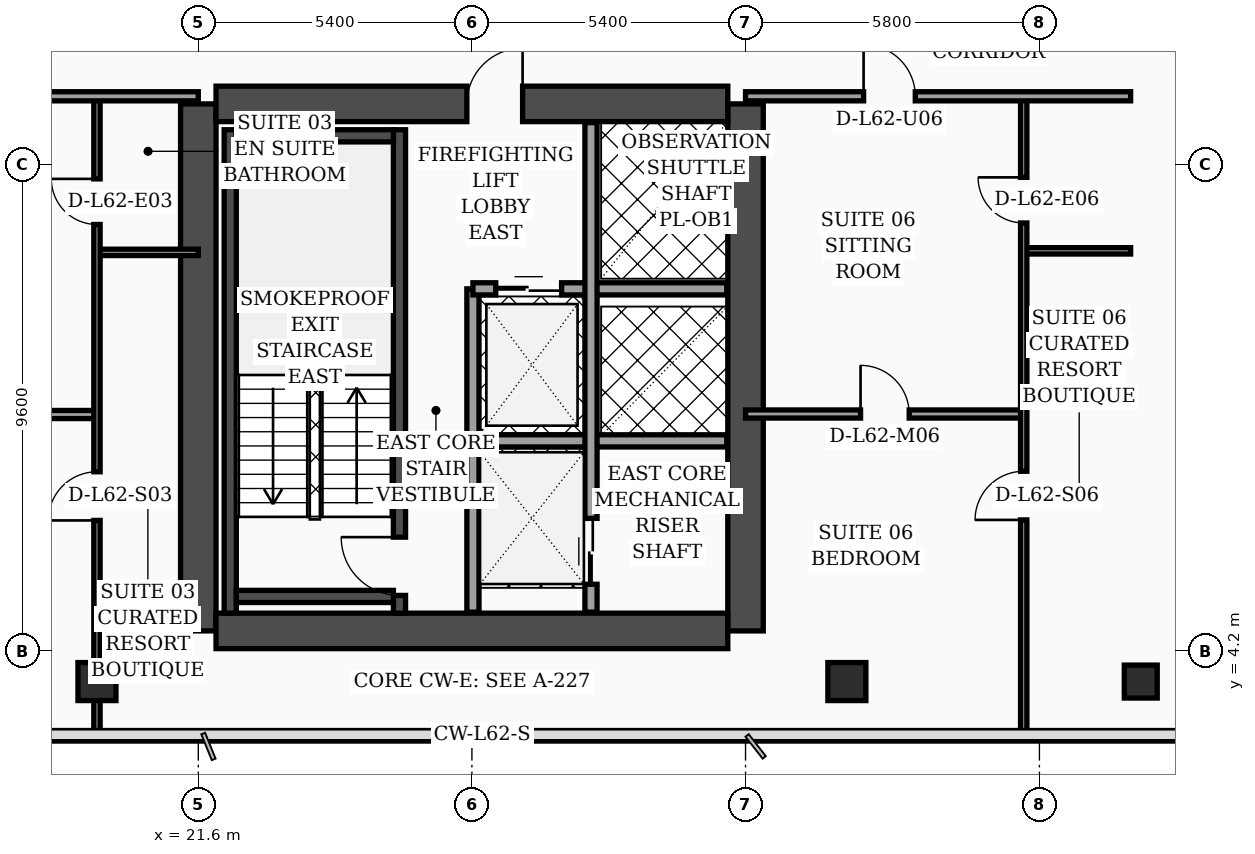
"""IFC4 building model, lengths in metres.
Left out: names, types, materials, properties, quantities, classifications, styles, units other than length and angle.
Written with IfcOpenShell. Run it as: python <this file> out.ifc"""

import sys

from ifc_helpers import new_model, si_unit, direction, frame, frame_2d, origin, origin_2d, place, context, subcontext, project, spatial, rectangle, hollow_rectangle, extrude, element, fill, save


model = new_model("IFC4")
c1 = context("Model", 3, precision=1e-05, world=origin(), true_north=direction((0.0, 1.0)))
c2 = subcontext(c1, "Body", "Model", "MODEL_VIEW")
j1 = project(units=[si_unit("LENGTHUNIT", "METRE"), si_unit("PLANEANGLEUNIT", "RADIAN")], contexts=[c1])
p1 = place(None, origin())
s1 = spatial("IfcSite", under=j1, at=p1, CompositionType="ELEMENT")
p2 = place(p1, origin())
s2 = spatial("IfcBuilding", under=s1, at=p2, CompositionType="ELEMENT")
p3 = place(p2, frame((0.0, 0.0, 251.4)))
s3 = spatial("IfcBuildingStorey", under=s2, at=p3, CompositionType="ELEMENT", Elevation=251.4)
for number, where, z_axis, x_axis in (
    (1, (21.6, 4.6, 0.0), (0.0, 0.0, 1.0), (0.0, 1.0, 0.0)),
    (2, (32.4, 4.6, 0.0), (0.0, 0.0, 1.0), (0.0, 1.0, 0.0)),
):
    element("IfcWall", number, at=place(p3, frame(where, z_axis=z_axis, x_axis=x_axis)), inside=s3, PredefinedType="SHEAR", context=c2, shape_type="SweptSolid", body=[
        extrude(rectangle(XDim=10.4, YDim=0.7, at=frame_2d((5.2, 0.0))), origin(), (0.0, 0.0, 1.0), 3.56),
    ])
p4 = place(p3, frame((21.95, 15.0, 0.0), z_axis=(0.0, 0.0, 1.0), x_axis=(1.0, 0.0, 0.0)))
e3 = element("IfcWall", 3, at=p4, inside=s3, PredefinedType="SHEAR", context=c2, shape_type="SweptSolid", body=[
    extrude(rectangle(XDim=10.1, YDim=0.7, at=frame_2d((5.05, 0.0))), origin(), (0.0, 0.0, 1.0), 3.56),
])
p5 = place(p4, frame((4.95, 0.0, 0.0)))
e4 = element("IfcOpeningElement", 4, at=p5, cuts=e3, PredefinedType="OPENING", context=c2, shape_type="SweptSolid", body=[
    extrude(rectangle(XDim=1.1, YDim=2.2, at=frame_2d((0.55, 1.1))), frame((0.0, 0.36, 0.0), z_axis=(0.0, -1.0, 0.0), x_axis=(1.0, 0.0, 0.0)), (0.0, 0.0, 1.0), 0.72),
])
p6 = place(p3, frame((21.95, 4.6, 0.0), z_axis=(0.0, 0.0, 1.0), x_axis=(1.0, 0.0, 0.0)))
e5 = element("IfcWall", 5, at=p6, inside=s3, PredefinedType="SHEAR", context=c2, shape_type="SweptSolid", body=[
    extrude(rectangle(XDim=10.1, YDim=0.7, at=frame_2d((5.05, 0.0))), origin(), (0.0, 0.0, 1.0), 3.56),
])
p7 = place(p3, frame((22.23, 4.95, 0.0), z_axis=(0.0, 0.0, 1.0), x_axis=(0.0, 1.0, 0.0)))
e6 = element("IfcWall", 6, at=p7, inside=s3, PredefinedType="SOLIDWALL", context=c2, shape_type="SweptSolid", body=[
    extrude(rectangle(XDim=9.54, YDim=0.24, at=frame_2d((4.77, 0.0))), origin(), (0.0, 0.0, 1.0), 3.56),
])
p8 = place(p3, frame((25.57, 4.95, 0.0), z_axis=(0.0, 0.0, 1.0), x_axis=(0.0, 1.0, 0.0)))
e7 = element("IfcWall", 7, at=p8, inside=s3, PredefinedType="SOLIDWALL", context=c2, shape_type="SweptSolid", body=[
    extrude(rectangle(XDim=9.54, YDim=0.24, at=frame_2d((4.77, 0.0))), origin(), (0.0, 0.0, 1.0), 3.56),
])
p9 = place(p8, frame((0.35, 0.0, 0.0)))
e8 = element("IfcOpeningElement", 8, at=p9, cuts=e7, PredefinedType="OPENING", context=c2, shape_type="SweptSolid", body=[
    extrude(rectangle(XDim=1.15, YDim=2.2, at=frame_2d((0.575, 1.1))), frame((0.0, 0.13, 0.0), z_axis=(0.0, -1.0, 0.0), x_axis=(1.0, 0.0, 0.0)), (0.0, 0.0, 1.0), 0.26),
])
for number, where, z_axis, x_axis in (
    (9, (22.35, 5.28, 0.0), (0.0, 0.0, 1.0), (1.0, 0.0, 0.0)),
    (10, (22.35, 14.37, 0.0), (0.0, 0.0, 1.0), (1.0, 0.0, 0.0)),
):
    element("IfcWall", number, at=place(p3, frame(where, z_axis=z_axis, x_axis=x_axis)), inside=s3, PredefinedType="SOLIDWALL", context=c2, shape_type="SweptSolid", body=[
        extrude(rectangle(XDim=3.1, YDim=0.24, at=frame_2d((1.55, 0.0))), origin(), (0.0, 0.0, 1.0), 3.56),
    ])
for number, where, z_axis, x_axis in (
    (11, (19.6, 3.6, 0.0), (0.0, 0.0, 1.0), (1.0, 0.0, 0.0)),
    (12, (34.4, 3.6, 0.0), (0.0, 0.0, 1.0), (1.0, 0.0, 0.0)),
):
    element("IfcColumn", number, at=place(p3, frame(where, z_axis=z_axis, x_axis=x_axis)), inside=s3, PredefinedType="COLUMN", context=c2, shape_type="SweptSolid", body=[
        extrude(hollow_rectangle(XDim=0.75, YDim=0.75, WallThickness=0.032, at=origin_2d()), origin(), (0.0, 0.0, 1.0), 3.56),
    ])
p10 = place(p3, frame((40.2, 3.6, 0.0), z_axis=(0.0, 0.0, 1.0), x_axis=(1.0, 0.0, 0.0)))
e13 = element("IfcColumn", 13, at=p10, inside=s3, PredefinedType="COLUMN", context=c2, shape_type="SweptSolid", body=[
    extrude(hollow_rectangle(XDim=0.65, YDim=0.65, WallThickness=0.028, at=origin_2d()), origin(), (0.0, 0.0, 1.0), 3.56),
])
p11 = place(p3, frame((46.63, 5.505, 0.0), z_axis=(0.0, 0.0, 1.0), x_axis=(-0.300501856448, 0.953781229775, 0.0)))
e14 = element("IfcWall", 14, at=p11, inside=s3, PredefinedType="SOLIDWALL", context=c2, shape_type="SweptSolid", body=[
    extrude(rectangle(XDim=30.814, YDim=0.32, at=frame_2d((15.407, 0.0))), origin(), (0.0, 0.0, 1.0), 3.56),
])
p12 = place(p11, frame((10.199, 0.0, 0.0)))
e15 = element("IfcOpeningElement", 15, at=p12, cuts=e14, PredefinedType="OPENING", context=c2, shape_type="SweptSolid", body=[
    extrude(rectangle(XDim=1.4, YDim=2.25, at=frame_2d((0.7, 1.125))), frame((0.0, 0.17, 0.0), z_axis=(0.0, -1.0, 0.0), x_axis=(1.0, 0.0, 0.0)), (0.0, 0.0, 1.0), 0.34),
])
p13 = place(p11, frame((4.437, 0.0, 0.7)))
e16 = element("IfcOpeningElement", 16, at=p13, cuts=e14, PredefinedType="OPENING", context=c2, shape_type="SweptSolid", body=[
    extrude(rectangle(XDim=1.6, YDim=1.65, at=frame_2d((0.8, 0.825))), frame((0.0, 0.17, 0.0), z_axis=(0.0, -1.0, 0.0), x_axis=(1.0, 0.0, 0.0)), (0.0, 0.0, 1.0), 0.34),
])
p14 = place(p11, frame((18.696, 0.0, 0.7)))
e17 = element("IfcOpeningElement", 17, at=p14, cuts=e14, PredefinedType="OPENING", context=c2, shape_type="SweptSolid", body=[
    extrude(rectangle(XDim=1.6, YDim=1.65, at=frame_2d((0.8, 0.825))), frame((0.0, 0.17, 0.0), z_axis=(0.0, -1.0, 0.0), x_axis=(1.0, 0.0, 0.0)), (0.0, 0.0, 1.0), 0.34),
])
p15 = place(p11, frame((1.6, 0.0, 0.75)))
e18 = element("IfcOpeningElement", 18, at=p15, cuts=e14, PredefinedType="OPENING", context=c2, shape_type="SweptSolid", body=[
    extrude(rectangle(XDim=1.5, YDim=1.6, at=frame_2d((0.75, 0.8))), frame((0.0, 0.17, 0.0), z_axis=(0.0, -1.0, 0.0), x_axis=(1.0, 0.0, 0.0)), (0.0, 0.0, 1.0), 0.34),
])
p16 = place(p11, frame((7.8, 0.0, 0.75)))
e19 = element("IfcOpeningElement", 19, at=p16, cuts=e14, PredefinedType="OPENING", context=c2, shape_type="SweptSolid", body=[
    extrude(rectangle(XDim=1.5, YDim=1.6, at=frame_2d((0.75, 0.8))), frame((0.0, 0.17, 0.0), z_axis=(0.0, -1.0, 0.0), x_axis=(1.0, 0.0, 0.0)), (0.0, 0.0, 1.0), 0.34),
])
p17 = place(p11, frame((14.0, 0.0, 0.75)))
e20 = element("IfcOpeningElement", 20, at=p17, cuts=e14, PredefinedType="OPENING", context=c2, shape_type="SweptSolid", body=[
    extrude(rectangle(XDim=1.5, YDim=1.6, at=frame_2d((0.75, 0.8))), frame((0.0, 0.17, 0.0), z_axis=(0.0, -1.0, 0.0), x_axis=(1.0, 0.0, 0.0)), (0.0, 0.0, 1.0), 0.34),
])
p18 = place(p11, frame((16.55, 0.0, 0.75)))
e21 = element("IfcOpeningElement", 21, at=p18, cuts=e14, PredefinedType="OPENING", context=c2, shape_type="SweptSolid", body=[
    extrude(rectangle(XDim=1.5, YDim=1.6, at=frame_2d((0.75, 0.8))), frame((0.0, 0.17, 0.0), z_axis=(0.0, -1.0, 0.0), x_axis=(1.0, 0.0, 0.0)), (0.0, 0.0, 1.0), 0.34),
])
p19 = place(p11, frame((20.75, 0.0, 0.75)))
e22 = element("IfcOpeningElement", 22, at=p19, cuts=e14, PredefinedType="OPENING", context=c2, shape_type="SweptSolid", body=[
    extrude(rectangle(XDim=1.5, YDim=1.6, at=frame_2d((0.75, 0.8))), frame((0.0, 0.17, 0.0), z_axis=(0.0, -1.0, 0.0), x_axis=(1.0, 0.0, 0.0)), (0.0, 0.0, 1.0), 0.34),
])
p20 = place(p11, frame((23.3, 0.0, 0.75)))
e23 = element("IfcOpeningElement", 23, at=p20, cuts=e14, PredefinedType="OPENING", context=c2, shape_type="SweptSolid", body=[
    extrude(rectangle(XDim=1.5, YDim=1.6, at=frame_2d((0.75, 0.8))), frame((0.0, 0.17, 0.0), z_axis=(0.0, -1.0, 0.0), x_axis=(1.0, 0.0, 0.0)), (0.0, 0.0, 1.0), 0.34),
])
p21 = place(p11, frame((26.4, 0.0, 0.75)))
e24 = element("IfcOpeningElement", 24, at=p21, cuts=e14, PredefinedType="OPENING", context=c2, shape_type="SweptSolid", body=[
    extrude(rectangle(XDim=1.5, YDim=1.6, at=frame_2d((0.75, 0.8))), frame((0.0, 0.17, 0.0), z_axis=(0.0, -1.0, 0.0), x_axis=(1.0, 0.0, 0.0)), (0.0, 0.0, 1.0), 0.34),
])
p22 = place(p3, frame((27.02, 4.97, 0.0), z_axis=(0.0, 0.0, 1.0), x_axis=(0.0, 1.0, 0.0)))
e25 = element("IfcWall", 25, at=p22, inside=s3, PredefinedType="SOLIDWALL", context=c2, shape_type="SweptSolid", body=[
    extrude(rectangle(XDim=6.38, YDim=0.24, at=frame_2d((3.19, 0.0))), origin(), (0.0, 0.0, 1.0), 3.56),
])
p23 = place(p3, frame((27.02, 11.35, 0.0), z_axis=(0.0, 0.0, 1.0), x_axis=(1.0, 0.0, 0.0)))
e26 = element("IfcWall", 26, at=p23, inside=s3, PredefinedType="SOLIDWALL", context=c2, shape_type="SweptSolid", body=[
    extrude(rectangle(XDim=5.01, YDim=0.24, at=frame_2d((2.505, 0.0))), origin(), (0.0, 0.0, 1.0), 3.56),
])
p24 = place(p23, frame((0.45, 0.0, 0.0)))
e27 = element("IfcOpeningElement", 27, at=p24, cuts=e26, PredefinedType="OPENING", context=c2, shape_type="SweptSolid", body=[
    extrude(rectangle(XDim=1.3, YDim=2.35, at=frame_2d((0.65, 1.175))), frame((0.0, 0.13, 0.0), z_axis=(0.0, -1.0, 0.0), x_axis=(1.0, 0.0, 0.0)), (0.0, 0.0, 1.0), 0.26),
])
p25 = place(p3, frame((27.02, 8.35, 0.0), z_axis=(0.0, 0.0, 1.0), x_axis=(1.0, 0.0, 0.0)))
e28 = element("IfcWall", 28, at=p25, inside=s3, PredefinedType="SOLIDWALL", context=c2, shape_type="SweptSolid", body=[
    extrude(rectangle(XDim=5.01, YDim=0.24, at=frame_2d((2.505, 0.0))), origin(), (0.0, 0.0, 1.0), 3.56),
])
p26 = place(p3, frame((29.35, 4.97, 0.0), z_axis=(0.0, 0.0, 1.0), x_axis=(0.0, 1.0, 0.0)))
e29 = element("IfcWall", 29, at=p26, inside=s3, PredefinedType="SOLIDWALL", context=c2, shape_type="SweptSolid", body=[
    extrude(rectangle(XDim=9.66, YDim=0.24, at=frame_2d((4.83, 0.0))), origin(), (0.0, 0.0, 1.0), 3.56),
])
p27 = place(p26, frame((0.55, 0.0, 0.0)))
e30 = element("IfcOpeningElement", 30, at=p27, cuts=e29, PredefinedType="OPENING", context=c2, shape_type="SweptSolid", body=[
    extrude(rectangle(XDim=1.3, YDim=2.35, at=frame_2d((0.65, 1.175))), frame((0.0, 0.13, 0.0), z_axis=(0.0, -1.0, 0.0), x_axis=(1.0, 0.0, 0.0)), (0.0, 0.0, 1.0), 0.26),
])
p28 = place(p3, frame((19.6, 12.07, 0.0), z_axis=(0.0, 0.0, 1.0), x_axis=(1.0, 0.0, 0.0)))
e31 = element("IfcWall", 31, at=p28, inside=s3, PredefinedType="PARTITIONING", context=c2, shape_type="SweptSolid", body=[
    extrude(rectangle(XDim=2.0, YDim=0.125, at=frame_2d((1.0, 0.0))), origin(), (0.0, 0.0, 1.0), 3.56),
])
p29 = place(p3, frame((15.15, 8.87, 0.0), z_axis=(0.0, 0.0, 1.0), x_axis=(1.0, 0.0, 0.0)))
e32 = element("IfcWall", 32, at=p29, inside=s3, PredefinedType="PARTITIONING", context=c2, shape_type="SweptSolid", body=[
    extrude(rectangle(XDim=4.45, YDim=0.16, at=frame_2d((2.225, 0.0))), origin(), (0.0, 0.0, 1.0), 3.56),
])
p30 = place(p29, frame((1.75, 0.0, 0.0)))
e33 = element("IfcOpeningElement", 33, at=p30, cuts=e32, PredefinedType="OPENING", context=c2, shape_type="SweptSolid", body=[
    extrude(rectangle(XDim=0.96, YDim=2.2, at=frame_2d((0.48, 1.1))), frame((0.0, 0.09, 0.0), z_axis=(0.0, -1.0, 0.0), x_axis=(1.0, 0.0, 0.0)), (0.0, 0.0, 1.0), 0.18),
])
p31 = place(p3, frame((19.6, 2.44, 0.0), z_axis=(0.0, 0.0, 1.0), x_axis=(0.0, 1.0, 0.0)))
e34 = element("IfcWall", 34, at=p31, inside=s3, PredefinedType="PARTITIONING", context=c2, shape_type="SweptSolid", body=[
    extrude(rectangle(XDim=12.71, YDim=0.125, at=frame_2d((6.355, 0.0))), origin(), (0.0, 0.0, 1.0), 2.59),
])
p32 = place(p31, frame((4.34, 0.0, 0.0)))
e35 = element("IfcOpeningElement", 35, at=p32, cuts=e34, PredefinedType="OPENING", context=c2, shape_type="SweptSolid", body=[
    extrude(rectangle(XDim=0.96, YDim=2.2, at=frame_2d((0.48, 1.1))), frame((0.0, 0.073, 0.0), z_axis=(0.0, -1.0, 0.0), x_axis=(1.0, 0.0, 0.0)), (0.0, 0.0, 1.0), 0.145),
])
p33 = place(p31, frame((10.18, 0.0, 0.0)))
e36 = element("IfcOpeningElement", 36, at=p33, cuts=e34, PredefinedType="OPENING", context=c2, shape_type="SweptSolid", body=[
    extrude(rectangle(XDim=0.9, YDim=2.15, at=frame_2d((0.45, 1.075))), frame((0.0, 0.073, 0.0), z_axis=(0.0, -1.0, 0.0), x_axis=(1.0, 0.0, 0.0)), (0.0, 0.0, 1.0), 0.145),
])
p34 = place(p3, frame((15.15, 15.15, 0.0), z_axis=(0.0, 0.0, 1.0), x_axis=(1.0, 0.0, 0.0)))
e37 = element("IfcWall", 37, at=p34, inside=s3, PredefinedType="PARTITIONING", context=c2, shape_type="SweptSolid", body=[
    extrude(rectangle(XDim=6.45, YDim=0.18, at=frame_2d((3.225, 0.0))), origin(), (0.0, 0.0, 1.0), 2.59),
])
p35 = place(p34, frame((1.74, 0.0, 0.0)))
e38 = element("IfcOpeningElement", 38, at=p35, cuts=e37, PredefinedType="OPENING", context=c2, shape_type="SweptSolid", body=[
    extrude(rectangle(XDim=1.02, YDim=2.2, at=frame_2d((0.51, 1.1))), frame((0.0, 0.1, 0.0), z_axis=(0.0, -1.0, 0.0), x_axis=(1.0, 0.0, 0.0)), (0.0, 0.0, 1.0), 0.2),
])
p36 = place(p3, frame((37.89, 12.1, 0.0), z_axis=(0.0, 0.0, 1.0), x_axis=(1.0, 0.0, 0.0)))
e39 = element("IfcWall", 39, at=p36, inside=s3, PredefinedType="PARTITIONING", context=c2, shape_type="SweptSolid", body=[
    extrude(rectangle(XDim=2.11, YDim=0.125, at=frame_2d((1.055, 0.0))), origin(), (0.0, 0.0, 1.0), 3.56),
])
p37 = place(p3, frame((32.4, 8.88, 0.0), z_axis=(0.0, 0.0, 1.0), x_axis=(1.0, 0.0, 0.0)))
e40 = element("IfcWall", 40, at=p37, inside=s3, PredefinedType="PARTITIONING", context=c2, shape_type="SweptSolid", body=[
    extrude(rectangle(XDim=5.49, YDim=0.16, at=frame_2d((2.745, 0.0))), origin(), (0.0, 0.0, 1.0), 2.99),
])
p38 = place(p37, frame((2.27, 0.0, 0.0)))
e41 = element("IfcOpeningElement", 41, at=p38, cuts=e40, PredefinedType="OPENING", context=c2, shape_type="SweptSolid", body=[
    extrude(rectangle(XDim=0.96, YDim=2.2, at=frame_2d((0.48, 1.1))), frame((0.0, 0.09, 0.0), z_axis=(0.0, -1.0, 0.0), x_axis=(1.0, 0.0, 0.0)), (0.0, 0.0, 1.0), 0.18),
])
p39 = place(p3, frame((37.89, 2.44, 0.0), z_axis=(0.0, 0.0, 1.0), x_axis=(0.0, 1.0, 0.0)))
e42 = element("IfcWall", 42, at=p39, inside=s3, PredefinedType="PARTITIONING", context=c2, shape_type="SweptSolid", body=[
    extrude(rectangle(XDim=12.71, YDim=0.125, at=frame_2d((6.355, 0.0))), origin(), (0.0, 0.0, 1.0), 2.99),
])
p40 = place(p39, frame((4.35, 0.0, 0.0)))
e43 = element("IfcOpeningElement", 43, at=p40, cuts=e42, PredefinedType="OPENING", context=c2, shape_type="SweptSolid", body=[
    extrude(rectangle(XDim=0.96, YDim=2.2, at=frame_2d((0.48, 1.1))), frame((0.0, 0.073, 0.0), z_axis=(0.0, -1.0, 0.0), x_axis=(1.0, 0.0, 0.0)), (0.0, 0.0, 1.0), 0.145),
])
p41 = place(p39, frame((10.21, 0.0, 0.0)))
e44 = element("IfcOpeningElement", 44, at=p41, cuts=e42, PredefinedType="OPENING", context=c2, shape_type="SweptSolid", body=[
    extrude(rectangle(XDim=0.9, YDim=2.15, at=frame_2d((0.45, 1.075))), frame((0.0, 0.073, 0.0), z_axis=(0.0, -1.0, 0.0), x_axis=(1.0, 0.0, 0.0)), (0.0, 0.0, 1.0), 0.145),
])
p42 = place(p3, frame((32.4, 15.15, 0.0), z_axis=(0.0, 0.0, 1.0), x_axis=(1.0, 0.0, 0.0)))
e45 = element("IfcWall", 45, at=p42, inside=s3, PredefinedType="PARTITIONING", context=c2, shape_type="SweptSolid", body=[
    extrude(rectangle(XDim=7.6, YDim=0.18, at=frame_2d((3.8, 0.0))), origin(), (0.0, 0.0, 1.0), 2.99),
])
p43 = place(p42, frame((2.33, 0.0, 0.0)))
e46 = element("IfcOpeningElement", 46, at=p43, cuts=e45, PredefinedType="OPENING", context=c2, shape_type="SweptSolid", body=[
    extrude(rectangle(XDim=1.02, YDim=2.2, at=frame_2d((0.51, 1.1))), frame((0.0, 0.1, 0.0), z_axis=(0.0, -1.0, 0.0), x_axis=(1.0, 0.0, 0.0)), (0.0, 0.0, 1.0), 0.2),
])
p44 = place(p24, origin())
e47 = element("IfcDoor", 47, at=p44, inside=s3, OperationType="DOUBLE_DOOR_SLIDING", PredefinedType="DOOR", context=c2, shape_type="SweptSolid", body=[
    extrude(rectangle(XDim=1.3, YDim=2.35, at=frame_2d((0.65, 1.175))), frame((0.0, 0.025, 0.0), z_axis=(0.0, -1.0, 0.0), x_axis=(1.0, 0.0, 0.0)), (0.0, 0.0, 1.0), 0.05),
])
fill(e27, e47)
p45 = place(p27, origin())
e48 = element("IfcDoor", 48, at=p45, inside=s3, OperationType="DOUBLE_DOOR_SLIDING", PredefinedType="DOOR", context=c2, shape_type="SweptSolid", body=[
    extrude(rectangle(XDim=1.3, YDim=2.35, at=frame_2d((0.65, 1.175))), frame((0.0, 0.025, 0.0), z_axis=(0.0, -1.0, 0.0), x_axis=(1.0, 0.0, 0.0)), (0.0, 0.0, 1.0), 0.05),
])
fill(e30, e48)
p46 = place(p32, origin())
e49 = element("IfcDoor", 49, at=p46, inside=s3, OperationType="SINGLE_SWING_LEFT", PredefinedType="DOOR", context=c2, shape_type="SweptSolid", body=[
    extrude(rectangle(XDim=0.96, YDim=2.2, at=frame_2d((0.48, 1.1))), frame((0.0, 0.025, 0.0), z_axis=(0.0, -1.0, 0.0), x_axis=(1.0, 0.0, 0.0)), (0.0, 0.0, 1.0), 0.05),
])
fill(e35, e49)
p47 = place(p33, origin())
e50 = element("IfcDoor", 50, at=p47, inside=s3, OperationType="SINGLE_SWING_RIGHT", PredefinedType="DOOR", context=c2, shape_type="SweptSolid", body=[
    extrude(rectangle(XDim=0.9, YDim=2.15, at=frame_2d((0.45, 1.075))), frame((0.0, 0.025, 0.0), z_axis=(0.0, -1.0, 0.0), x_axis=(1.0, 0.0, 0.0)), (0.0, 0.0, 1.0), 0.05),
])
fill(e36, e50)
p48 = place(p38, origin())
e51 = element("IfcDoor", 51, at=p48, inside=s3, OperationType="SINGLE_SWING_LEFT", PredefinedType="DOOR", context=c2, shape_type="SweptSolid", body=[
    extrude(rectangle(XDim=0.96, YDim=2.2, at=frame_2d((0.48, 1.1))), frame((0.0, 0.025, 0.0), z_axis=(0.0, -1.0, 0.0), x_axis=(1.0, 0.0, 0.0)), (0.0, 0.0, 1.0), 0.05),
])
fill(e41, e51)
p49 = place(p40, origin())
e52 = element("IfcDoor", 52, at=p49, inside=s3, OperationType="SINGLE_SWING_LEFT", PredefinedType="DOOR", context=c2, shape_type="SweptSolid", body=[
    extrude(rectangle(XDim=0.96, YDim=2.2, at=frame_2d((0.48, 1.1))), frame((0.0, 0.025, 0.0), z_axis=(0.0, -1.0, 0.0), x_axis=(1.0, 0.0, 0.0)), (0.0, 0.0, 1.0), 0.05),
])
fill(e43, e52)
p50 = place(p41, origin())
e53 = element("IfcDoor", 53, at=p50, inside=s3, OperationType="SINGLE_SWING_RIGHT", PredefinedType="DOOR", context=c2, shape_type="SweptSolid", body=[
    extrude(rectangle(XDim=0.9, YDim=2.15, at=frame_2d((0.45, 1.075))), frame((0.0, 0.025, 0.0), z_axis=(0.0, -1.0, 0.0), x_axis=(1.0, 0.0, 0.0)), (0.0, 0.0, 1.0), 0.05),
])
fill(e44, e53)
p51 = place(p43, origin())
e54 = element("IfcDoor", 54, at=p51, inside=s3, OperationType="SINGLE_SWING_LEFT", PredefinedType="DOOR", context=c2, shape_type="SweptSolid", body=[
    extrude(rectangle(XDim=1.02, YDim=2.2, at=frame_2d((0.51, 1.1))), frame((0.0, 0.025, 0.0), z_axis=(0.0, -1.0, 0.0), x_axis=(1.0, 0.0, 0.0)), (0.0, 0.0, 1.0), 0.05),
])
fill(e46, e54)
p52 = place(p9, origin())
e55 = element("IfcDoor", 55, at=p52, inside=s3, OperationType="SINGLE_SWING_RIGHT", PredefinedType="DOOR", context=c2, shape_type="SweptSolid", body=[
    extrude(rectangle(XDim=1.15, YDim=2.2, at=frame_2d((0.575, 1.1))), frame((0.0, 0.025, 0.0), z_axis=(0.0, -1.0, 0.0), x_axis=(1.0, 0.0, 0.0)), (0.0, 0.0, 1.0), 0.05),
])
fill(e8, e55)
p53 = place(p5, origin())
e56 = element("IfcDoor", 56, at=p53, inside=s3, OperationType="SINGLE_SWING_RIGHT", PredefinedType="DOOR", context=c2, shape_type="SweptSolid", body=[
    extrude(rectangle(XDim=1.1, YDim=2.2, at=frame_2d((0.55, 1.1))), frame((0.0, 0.025, 0.0), z_axis=(0.0, -1.0, 0.0), x_axis=(1.0, 0.0, 0.0)), (0.0, 0.0, 1.0), 0.05),
])
fill(e4, e56)
save(model, sys.argv[1])
